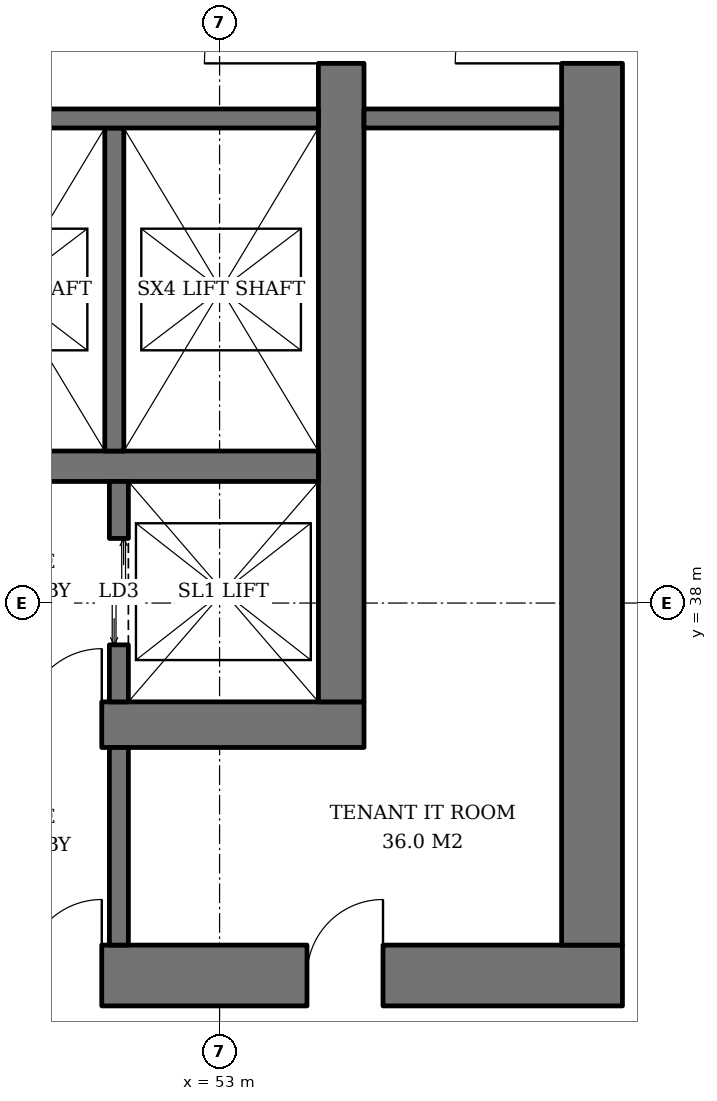
"""IFC4 building model, lengths in metres.
Left out: names, types, materials, properties, quantities, classifications, styles, units other than length and angle.
Written with IfcOpenShell. Run it as: python <this file> out.ifc"""

import sys

from ifc_helpers import new_model, si_unit, direction, frame, frame_2d, origin, place, context, subcontext, project, spatial, rectangle, extrude, element, fill, save


model = new_model("IFC4")
c1 = context("Model", 3, precision=1e-05, world=origin(), true_north=direction((0.0, 1.0)))
c2 = subcontext(c1, "Body", "Model", "MODEL_VIEW")
j1 = project(units=[si_unit("LENGTHUNIT", "METRE"), si_unit("PLANEANGLEUNIT", "RADIAN")], contexts=[c1])
p1 = place(None, origin())
s1 = spatial("IfcSite", under=j1, at=p1, CompositionType="ELEMENT")
p2 = place(p1, origin())
s2 = spatial("IfcBuilding", under=s1, at=p2, CompositionType="ELEMENT")
p3 = place(p2, frame((0.0, 0.0, 21.0)))
s3 = spatial("IfcBuildingStorey", under=s2, at=p3, CompositionType="ELEMENT", Elevation=21.0)
p4 = place(p3, frame((35.1, 36.4, 0.0), z_axis=(0.0, 0.0, 1.0), x_axis=(1.0, 0.0, 0.0)))
e1 = element("IfcWall", 1, at=p4, inside=s3, PredefinedType="SHEAR", context=c2, shape_type="SweptSolid", body=[
    extrude(rectangle(XDim=19.8, YDim=0.6, at=frame_2d((9.9, 0.0))), origin(), (0.0, 0.0, 1.0), 3.8),
])
p5 = place(p4, frame((3.9, 0.0, 0.0)))
e2 = element("IfcOpeningElement", 2, at=p5, cuts=e1, PredefinedType="OPENING", context=c2, shape_type="SweptSolid", body=[
    extrude(rectangle(XDim=1.0, YDim=2.1, at=frame_2d((0.5, 1.05))), frame((0.0, 0.31, 0.0), z_axis=(0.0, -1.0, 0.0), x_axis=(1.0, 0.0, 0.0)), (0.0, 0.0, 1.0), 0.62),
])
p6 = place(p4, frame((15.35, 0.0, 0.0)))
e3 = element("IfcOpeningElement", 3, at=p6, cuts=e1, PredefinedType="OPENING", context=c2, shape_type="SweptSolid", body=[
    extrude(rectangle(XDim=1.0, YDim=2.1, at=frame_2d((0.5, 1.05))), frame((0.0, 0.31, 0.0), z_axis=(0.0, -1.0, 0.0), x_axis=(1.0, 0.0, 0.0)), (0.0, 0.0, 1.0), 0.62),
])
p7 = place(p3, frame((54.6, 36.7, 0.0), z_axis=(0.0, 0.0, 1.0), x_axis=(0.0, 1.0, 0.0)))
e4 = element("IfcWall", 4, at=p7, inside=s3, PredefinedType="SHEAR", context=c2, shape_type="SweptSolid", body=[
    extrude(rectangle(XDim=18.6, YDim=0.6, at=frame_2d((9.3, 0.0))), origin(), (0.0, 0.0, 1.0), 3.8),
])
p8 = place(p7, frame((8.4, 0.0, 0.0)))
e5 = element("IfcOpeningElement", 5, at=p8, cuts=e4, PredefinedType="OPENING", context=c2, shape_type="SweptSolid", body=[
    extrude(rectangle(XDim=1.8, YDim=2.4, at=frame_2d((0.9, 1.2))), frame((0.0, 0.31, 0.0), z_axis=(0.0, -1.0, 0.0), x_axis=(1.0, 0.0, 0.0)), (0.0, 0.0, 1.0), 0.62),
])
p9 = place(p3, frame((31.7, 33.1, 0.0), z_axis=(0.0, 0.0, 1.0), x_axis=(1.0, 0.0, 0.0)))
e6 = element("IfcWall", 6, at=p9, inside=s3, PredefinedType="SHEAR", context=c2, shape_type="SweptSolid", body=[
    extrude(rectangle(XDim=26.6, YDim=0.8, at=frame_2d((13.3, 0.0))), origin(), (0.0, 0.0, 1.0), 3.8),
])
p10 = place(p9, frame((7.3, 0.0, 0.0)))
e7 = element("IfcOpeningElement", 7, at=p10, cuts=e6, PredefinedType="OPENING", context=c2, shape_type="SweptSolid", body=[
    extrude(rectangle(XDim=1.0, YDim=2.1, at=frame_2d((0.5, 1.05))), frame((0.0, 0.41, 0.0), z_axis=(0.0, -1.0, 0.0), x_axis=(1.0, 0.0, 0.0)), (0.0, 0.0, 1.0), 0.82),
])
p11 = place(p9, frame((18.75, 0.0, 0.0)))
e8 = element("IfcOpeningElement", 8, at=p11, cuts=e6, PredefinedType="OPENING", context=c2, shape_type="SweptSolid", body=[
    extrude(rectangle(XDim=1.0, YDim=2.1, at=frame_2d((0.5, 1.05))), frame((0.0, 0.41, 0.0), z_axis=(0.0, -1.0, 0.0), x_axis=(1.0, 0.0, 0.0)), (0.0, 0.0, 1.0), 0.82),
])
p12 = place(p9, frame((3.25, 0.0, 0.0)))
e9 = element("IfcOpeningElement", 9, at=p12, cuts=e6, PredefinedType="OPENING", context=c2, shape_type="SweptSolid", body=[
    extrude(rectangle(XDim=1.0, YDim=2.1, at=frame_2d((0.5, 1.05))), frame((0.0, 0.41, 0.0), z_axis=(0.0, -1.0, 0.0), x_axis=(1.0, 0.0, 0.0)), (0.0, 0.0, 1.0), 0.82),
])
p13 = place(p9, frame((10.42, 0.0, 0.0)))
e10 = element("IfcOpeningElement", 10, at=p13, cuts=e6, PredefinedType="OPENING", context=c2, shape_type="SweptSolid", body=[
    extrude(rectangle(XDim=1.0, YDim=2.1, at=frame_2d((0.5, 1.05))), frame((0.0, 0.41, 0.0), z_axis=(0.0, -1.0, 0.0), x_axis=(1.0, 0.0, 0.0)), (0.0, 0.0, 1.0), 0.82),
])
p14 = place(p9, frame((14.46, 0.0, 0.0)))
e11 = element("IfcOpeningElement", 11, at=p14, cuts=e6, PredefinedType="OPENING", context=c2, shape_type="SweptSolid", body=[
    extrude(rectangle(XDim=1.0, YDim=2.1, at=frame_2d((0.5, 1.05))), frame((0.0, 0.41, 0.0), z_axis=(0.0, -1.0, 0.0), x_axis=(1.0, 0.0, 0.0)), (0.0, 0.0, 1.0), 0.82),
])
p15 = place(p9, frame((22.45, 0.0, 0.0)))
e12 = element("IfcOpeningElement", 12, at=p15, cuts=e6, PredefinedType="OPENING", context=c2, shape_type="SweptSolid", body=[
    extrude(rectangle(XDim=1.0, YDim=2.1, at=frame_2d((0.5, 1.05))), frame((0.0, 0.41, 0.0), z_axis=(0.0, -1.0, 0.0), x_axis=(1.0, 0.0, 0.0)), (0.0, 0.0, 1.0), 0.82),
])
p16 = place(p3, frame((57.9, 33.5, 0.0), z_axis=(0.0, 0.0, 1.0), x_axis=(0.0, 1.0, 0.0)))
e13 = element("IfcWall", 13, at=p16, inside=s3, PredefinedType="SHEAR", context=c2, shape_type="SweptSolid", body=[
    extrude(rectangle(XDim=25.0, YDim=0.8, at=frame_2d((12.5, 0.0))), origin(), (0.0, 0.0, 1.0), 3.8),
])
p17 = place(p16, frame((11.6, 0.0, 0.0)))
e14 = element("IfcOpeningElement", 14, at=p17, cuts=e13, PredefinedType="OPENING", context=c2, shape_type="SweptSolid", body=[
    extrude(rectangle(XDim=1.8, YDim=2.4, at=frame_2d((0.9, 1.2))), frame((0.0, 0.41, 0.0), z_axis=(0.0, -1.0, 0.0), x_axis=(1.0, 0.0, 0.0)), (0.0, 0.0, 1.0), 0.82),
])
p18 = place(p3, frame((35.7, 39.8, 0.0), z_axis=(0.0, 0.0, 1.0), x_axis=(1.0, 0.0, 0.0)))
e15 = element("IfcWall", 15, at=p18, inside=s3, PredefinedType="SHEAR", context=c2, shape_type="SweptSolid", body=[
    extrude(rectangle(XDim=18.6, YDim=0.4, at=frame_2d((9.3, 0.0))), origin(), (0.0, 0.0, 1.0), 3.8),
])
p19 = place(p3, frame((51.675, 36.7, 0.0), z_axis=(0.0, 0.0, 1.0), x_axis=(0.0, 1.0, 0.0)))
e16 = element("IfcWall", 16, at=p19, inside=s3, PredefinedType="SHEAR", context=c2, shape_type="SweptSolid", body=[
    extrude(rectangle(XDim=2.9, YDim=0.25, at=frame_2d((1.45, 0.0))), origin(), (0.0, 0.0, 1.0), 3.8),
])
p20 = place(p19, frame((0.75, 0.0, 0.0)))
e17 = element("IfcOpeningElement", 17, at=p20, cuts=e16, PredefinedType="OPENING", context=c2, shape_type="SweptSolid", body=[
    extrude(rectangle(XDim=1.4, YDim=2.4, at=frame_2d((0.7, 1.2))), frame((0.0, 0.135, 0.0), z_axis=(0.0, -1.0, 0.0), x_axis=(1.0, 0.0, 0.0)), (0.0, 0.0, 1.0), 0.27),
])
p21 = place(p3, frame((51.615, 44.25, 0.0), z_axis=(0.0, 0.0, 1.0), x_axis=(0.0, -1.0, 0.0)))
e18 = element("IfcWall", 18, at=p21, inside=s3, PredefinedType="SHEAR", context=c2, shape_type="SweptSolid", body=[
    extrude(rectangle(XDim=4.25, YDim=0.25, at=frame_2d((2.125, 0.0))), origin(), (0.0, 0.0, 1.0), 3.8),
])
p22 = place(p3, frame((48.93, 44.375, 0.0), z_axis=(0.0, 0.0, 1.0), x_axis=(1.0, 0.0, 0.0)))
e19 = element("IfcWall", 19, at=p22, inside=s3, PredefinedType="SHEAR", context=c2, shape_type="SweptSolid", body=[
    extrude(rectangle(XDim=5.37, YDim=0.25, at=frame_2d((2.685, 0.0))), origin(), (0.0, 0.0, 1.0), 3.8),
])
for number, where, z_axis, x_axis in (
    (20, (54.9, 44.375, 0.0), (0.0, 0.0, 1.0), (1.0, 0.0, 0.0)),
    (21, (51.675, 33.5, 0.0), (0.0, 0.0, 1.0), (0.0, 1.0, 0.0)),
):
    element("IfcWall", number, at=place(p3, frame(where, z_axis=z_axis, x_axis=x_axis)), inside=s3, PredefinedType="SOLIDWALL", context=c2, shape_type="SweptSolid", body=[
        extrude(rectangle(XDim=2.6, YDim=0.25, at=frame_2d((1.3, 0.0))), origin(), (0.0, 0.0, 1.0), 3.62),
    ])
p23 = place(p20, origin())
e22 = element("IfcDoor", 22, at=p23, inside=s3, OperationType="DOUBLE_DOOR_SLIDING", PredefinedType="DOOR", context=c2, shape_type="SweptSolid", body=[
    extrude(rectangle(XDim=1.4, YDim=2.4, at=frame_2d((0.7, 1.2))), frame((0.0, 0.025, 0.0), z_axis=(0.0, -1.0, 0.0), x_axis=(1.0, 0.0, 0.0)), (0.0, 0.0, 1.0), 0.05),
])
fill(e17, e22)
p24 = place(p8, origin())
e23 = element("IfcDoor", 23, at=p24, inside=s3, OperationType="DOUBLE_DOOR_SINGLE_SWING", PredefinedType="DOOR", context=c2, shape_type="SweptSolid", body=[
    extrude(rectangle(XDim=1.8, YDim=2.4, at=frame_2d((0.9, 1.2))), frame((0.0, 0.025, 0.0), z_axis=(0.0, -1.0, 0.0), x_axis=(1.0, 0.0, 0.0)), (0.0, 0.0, 1.0), 0.05),
])
fill(e5, e23)
p25 = place(p6, origin())
e24 = element("IfcDoor", 24, at=p25, inside=s3, OperationType="SINGLE_SWING_RIGHT", PredefinedType="DOOR", context=c2, shape_type="SweptSolid", body=[
    extrude(rectangle(XDim=1.0, YDim=2.1, at=frame_2d((0.5, 1.05))), frame((0.0, 0.025, 0.0), z_axis=(0.0, -1.0, 0.0), x_axis=(1.0, 0.0, 0.0)), (0.0, 0.0, 1.0), 0.05),
])
fill(e3, e24)
p26 = place(p17, origin())
e25 = element("IfcDoor", 25, at=p26, inside=s3, OperationType="DOUBLE_DOOR_SINGLE_SWING", PredefinedType="DOOR", context=c2, shape_type="SweptSolid", body=[
    extrude(rectangle(XDim=1.8, YDim=2.4, at=frame_2d((0.9, 1.2))), frame((0.0, 0.025, 0.0), z_axis=(0.0, -1.0, 0.0), x_axis=(1.0, 0.0, 0.0)), (0.0, 0.0, 1.0), 0.05),
])
fill(e14, e25)
p27 = place(p11, origin())
e26 = element("IfcDoor", 26, at=p27, inside=s3, OperationType="SINGLE_SWING_RIGHT", PredefinedType="DOOR", context=c2, shape_type="SweptSolid", body=[
    extrude(rectangle(XDim=1.0, YDim=2.1, at=frame_2d((0.5, 1.05))), frame((0.0, 0.025, 0.0), z_axis=(0.0, -1.0, 0.0), x_axis=(1.0, 0.0, 0.0)), (0.0, 0.0, 1.0), 0.05),
])
fill(e8, e26)
p28 = place(p15, origin())
e27 = element("IfcDoor", 27, at=p28, inside=s3, OperationType="SINGLE_SWING_RIGHT", PredefinedType="DOOR", context=c2, shape_type="SweptSolid", body=[
    extrude(rectangle(XDim=1.0, YDim=2.1, at=frame_2d((0.5, 1.05))), frame((0.0, 0.39, 0.0), z_axis=(0.0, -1.0, 0.0), x_axis=(1.0, 0.0, 0.0)), (0.0, 0.0, 1.0), 0.05),
])
fill(e12, e27)
save(model, sys.argv[1])
